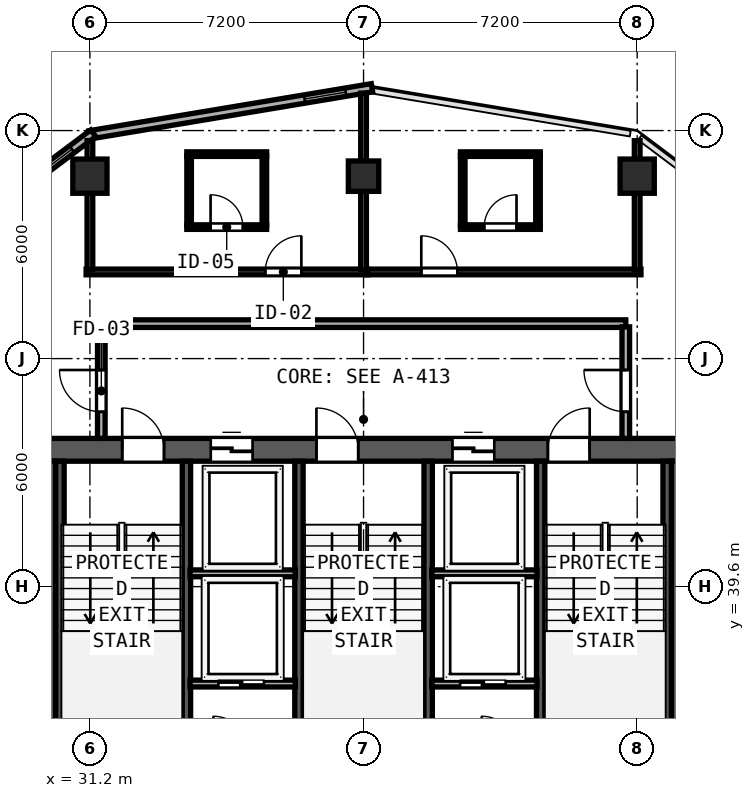
"""IFC4 building model, lengths in metres.
Left out: names, types, materials, properties, quantities, classifications, styles, units other than length and angle.
Written with IfcOpenShell. Run it as: python <this file> out.ifc"""

import sys

from ifc_helpers import new_model, si_unit, direction, frame, frame_2d, origin, origin_2d, place, context, subcontext, project, spatial, rectangle, hollow_rectangle, extrude, element, fill, save


model = new_model("IFC4")
c1 = context("Model", 3, precision=1e-05, world=origin(), true_north=direction((0.0, 1.0)))
c2 = subcontext(c1, "Body", "Model", "MODEL_VIEW")
j1 = project(units=[si_unit("LENGTHUNIT", "METRE"), si_unit("PLANEANGLEUNIT", "RADIAN")], contexts=[c1])
p1 = place(None, origin())
s1 = spatial("IfcSite", under=j1, at=p1, CompositionType="ELEMENT")
p2 = place(p1, origin())
s2 = spatial("IfcBuilding", under=s1, at=p2, CompositionType="ELEMENT")
p3 = place(p2, frame((0.0, 0.0, 215.4)))
s3 = spatial("IfcBuildingStorey", under=s2, at=p3, CompositionType="ELEMENT", Elevation=215.4)
p4 = place(p3, frame((29.7, 43.2, 0.0), z_axis=(0.0, 0.0, 1.0), x_axis=(1.0, 0.0, 0.0)))
e1 = element("IfcWall", 1, at=p4, inside=s3, PredefinedType="SHEAR", context=c2, shape_type="SweptSolid", body=[
    extrude(rectangle(XDim=17.4, YDim=0.6, at=frame_2d((8.7, 0.0))), origin(), (0.0, 0.0, 1.0), 3.62),
])
p5 = place(p4, frame((2.35, 0.0, 0.0)))
e2 = element("IfcOpeningElement", 2, at=p5, cuts=e1, PredefinedType="OPENING", context=c2, shape_type="SweptSolid", body=[
    extrude(rectangle(XDim=1.1, YDim=2.15, at=frame_2d((0.55, 1.075))), frame((0.0, 0.31, 0.0), z_axis=(0.0, -1.0, 0.0), x_axis=(1.0, 0.0, 0.0)), (0.0, 0.0, 1.0), 0.62),
])
p6 = place(p4, frame((7.46, 0.0, 0.0)))
e3 = element("IfcOpeningElement", 3, at=p6, cuts=e1, PredefinedType="OPENING", context=c2, shape_type="SweptSolid", body=[
    extrude(rectangle(XDim=1.1, YDim=2.15, at=frame_2d((0.55, 1.075))), frame((0.0, 0.31, 0.0), z_axis=(0.0, -1.0, 0.0), x_axis=(1.0, 0.0, 0.0)), (0.0, 0.0, 1.0), 0.62),
])
p7 = place(p4, frame((13.55, 0.0, 0.0)))
e4 = element("IfcOpeningElement", 4, at=p7, cuts=e1, PredefinedType="OPENING", context=c2, shape_type="SweptSolid", body=[
    extrude(rectangle(XDim=1.1, YDim=2.15, at=frame_2d((0.55, 1.075))), frame((0.0, 0.31, 0.0), z_axis=(0.0, -1.0, 0.0), x_axis=(1.0, 0.0, 0.0)), (0.0, 0.0, 1.0), 0.62),
])
p8 = place(p4, frame((4.68, 0.0, 0.0)))
e5 = element("IfcOpeningElement", 5, at=p8, cuts=e1, PredefinedType="OPENING", context=c2, shape_type="SweptSolid", body=[
    extrude(rectangle(XDim=1.1, YDim=2.2, at=frame_2d((0.55, 1.1))), frame((0.0, 0.31, 0.0), z_axis=(0.0, -1.0, 0.0), x_axis=(1.0, 0.0, 0.0)), (0.0, 0.0, 1.0), 0.62),
])
p9 = place(p4, frame((11.04, 0.0, 0.0)))
e6 = element("IfcOpeningElement", 6, at=p9, cuts=e1, PredefinedType="OPENING", context=c2, shape_type="SweptSolid", body=[
    extrude(rectangle(XDim=1.1, YDim=2.2, at=frame_2d((0.55, 1.1))), frame((0.0, 0.31, 0.0), z_axis=(0.0, -1.0, 0.0), x_axis=(1.0, 0.0, 0.0)), (0.0, 0.0, 1.0), 0.62),
])
for number, where, z_axis, x_axis in (
    (7, (30.0, 32.8, 0.0), (0.0, 0.0, 1.0), (0.0, 1.0, 0.0)),
    (8, (46.8, 32.8, 0.0), (0.0, 0.0, 1.0), (0.0, 1.0, 0.0)),
):
    element("IfcWall", number, at=place(p3, frame(where, z_axis=z_axis, x_axis=x_axis)), inside=s3, PredefinedType="SHEAR", context=c2, shape_type="SweptSolid", body=[
        extrude(rectangle(XDim=10.1, YDim=0.6, at=frame_2d((5.05, 0.0))), origin(), (0.0, 0.0, 1.0), 3.62),
    ])
for number, where, z_axis, x_axis in (
    (9, (30.412, 35.39, 0.0), (0.0, 0.0, 1.0), (0.0, 1.0, 0.0)),
    (10, (33.74, 35.39, 0.0), (0.0, 0.0, 1.0), (0.0, 1.0, 0.0)),
    (11, (36.7, 35.39, 0.0), (0.0, 0.0, 1.0), (0.0, 1.0, 0.0)),
    (12, (40.1, 35.39, 0.0), (0.0, 0.0, 1.0), (0.0, 1.0, 0.0)),
    (13, (43.06, 35.39, 0.0), (0.0, 0.0, 1.0), (0.0, 1.0, 0.0)),
    (14, (46.388, 35.39, 0.0), (0.0, 0.0, 1.0), (0.0, 1.0, 0.0)),
):
    element("IfcWall", number, at=place(p3, frame(where, z_axis=z_axis, x_axis=x_axis)), inside=s3, PredefinedType="SHEAR", context=c2, shape_type="SweptSolid", body=[
        extrude(rectangle(XDim=7.51, YDim=0.22, at=frame_2d((3.755, 0.0))), origin(), (0.0, 0.0, 1.0), 3.62),
    ])
for number, where, z_axis, x_axis in (
    (15, (31.2, 50.4, 0.0), (0.0, 0.0, 1.0), (1.0, 0.0, 0.0)),
    (16, (45.6, 50.4, 0.0), (0.0, 0.0, 1.0), (1.0, 0.0, 0.0)),
):
    element("IfcColumn", number, at=place(p3, frame(where, z_axis=z_axis, x_axis=x_axis)), inside=s3, PredefinedType="COLUMN", context=c2, shape_type="SweptSolid", body=[
        extrude(hollow_rectangle(XDim=0.9, YDim=0.9, WallThickness=0.034, at=origin_2d()), origin(), (0.0, 0.0, 1.0), 3.8),
    ])
p10 = place(p3, frame((38.4, 50.4, 0.0), z_axis=(0.0, 0.0, 1.0), x_axis=(1.0, 0.0, 0.0)))
e17 = element("IfcColumn", 17, at=p10, inside=s3, PredefinedType="COLUMN", context=c2, shape_type="SweptSolid", body=[
    extrude(hollow_rectangle(XDim=0.8, YDim=0.8, WallThickness=0.03, at=origin_2d()), origin(), (0.0, 0.0, 1.0), 3.8),
])
p11 = place(p3, frame((38.622, 52.726, 0.0), z_axis=(0.0, 0.0, 1.0), x_axis=(-0.986390420428, -0.164420006349, 0.0)))
e18 = element("IfcWall", 18, at=p11, inside=s3, PredefinedType="SOLIDWALL", context=c2, shape_type="SweptSolid", body=[
    extrude(rectangle(XDim=7.534, YDim=0.22, at=frame_2d((3.767, 0.0))), origin(), (0.0, 0.0, 1.0), 3.62),
])
p12 = place(p11, frame((0.7, 0.0, 0.85)))
e19 = element("IfcOpeningElement", 19, at=p12, cuts=e18, PredefinedType="OPENING", context=c2, shape_type="SweptSolid", body=[
    extrude(rectangle(XDim=1.1, YDim=1.75, at=frame_2d((0.55, 0.875))), frame((0.0, 0.12, 0.0), z_axis=(0.0, -1.0, 0.0), x_axis=(1.0, 0.0, 0.0)), (0.0, 0.0, 1.0), 0.24),
])
p13 = place(p3, frame((31.289, 51.529, 0.0), z_axis=(0.0, 0.0, 1.0), x_axis=(-0.800014580093, -0.599980559383, 0.0)))
e20 = element("IfcWall", 20, at=p13, inside=s3, PredefinedType="SOLIDWALL", context=c2, shape_type="SweptSolid", body=[
    extrude(rectangle(XDim=6.028, YDim=0.22, at=frame_2d((3.014, 0.0))), origin(), (0.0, 0.0, 1.0), 3.62),
])
p14 = place(p13, frame((0.7, 0.0, 0.85)))
e21 = element("IfcOpeningElement", 21, at=p14, cuts=e20, PredefinedType="OPENING", context=c2, shape_type="SweptSolid", body=[
    extrude(rectangle(XDim=1.1, YDim=1.75, at=frame_2d((0.55, 0.875))), frame((0.0, 0.12, 0.0), z_axis=(0.0, -1.0, 0.0), x_axis=(1.0, 0.0, 0.0)), (0.0, 0.0, 1.0), 0.24),
])
p15 = place(p3, frame((31.5, 46.52, 0.0), z_axis=(0.0, 0.0, 1.0), x_axis=(1.0, 0.0, 0.0)))
e22 = element("IfcWall", 22, at=p15, inside=s3, PredefinedType="SOLIDWALL", context=c2, shape_type="SweptSolid", body=[
    extrude(rectangle(XDim=13.8, YDim=0.2, at=frame_2d((6.9, 0.0))), origin(), (0.0, 0.0, 1.0), 3.62),
])
p16 = place(p3, frame((31.5, 43.5, 0.0), z_axis=(0.0, 0.0, 1.0), x_axis=(0.0, 1.0, 0.0)))
e23 = element("IfcWall", 23, at=p16, inside=s3, PredefinedType="SOLIDWALL", context=c2, shape_type="SweptSolid", body=[
    extrude(rectangle(XDim=2.935, YDim=0.2, at=frame_2d((1.468, 0.0))), origin(), (0.0, 0.0, 1.0), 3.62),
])
p17 = place(p16, frame((1.8, 0.0, 0.0), z_axis=(0.0, 0.0, 1.0), x_axis=(-1.0, 0.0, 0.0)))
e24 = element("IfcOpeningElement", 24, at=p17, cuts=e23, PredefinedType="OPENING", context=c2, shape_type="SweptSolid", body=[
    extrude(rectangle(XDim=1.1, YDim=2.15, at=frame_2d((0.55, 1.075))), frame((0.0, 0.11, 0.0), z_axis=(0.0, -1.0, 0.0), x_axis=(1.0, 0.0, 0.0)), (0.0, 0.0, 1.0), 0.22),
])
p18 = place(p3, frame((45.3, 43.5, 0.0), z_axis=(0.0, 0.0, 1.0), x_axis=(0.0, 1.0, 0.0)))
e25 = element("IfcWall", 25, at=p18, inside=s3, PredefinedType="SOLIDWALL", context=c2, shape_type="SweptSolid", body=[
    extrude(rectangle(XDim=2.935, YDim=0.2, at=frame_2d((1.468, 0.0))), origin(), (0.0, 0.0, 1.0), 3.62),
])
p19 = place(p18, frame((0.7, 0.0, 0.0)))
e26 = element("IfcOpeningElement", 26, at=p19, cuts=e25, PredefinedType="OPENING", context=c2, shape_type="SweptSolid", body=[
    extrude(rectangle(XDim=1.1, YDim=2.15, at=frame_2d((0.55, 1.075))), frame((0.0, 0.11, 0.0), z_axis=(0.0, -1.0, 0.0), x_axis=(1.0, 0.0, 0.0)), (0.0, 0.0, 1.0), 0.22),
])
for number, where, z_axis, x_axis in (
    (27, (33.835, 39.95, 0.0), (0.0, 0.0, 1.0), (1.0, 0.0, 0.0)),
    (28, (40.195, 39.95, 0.0), (0.0, 0.0, 1.0), (1.0, 0.0, 0.0)),
):
    element("IfcWall", number, at=place(p3, frame(where, z_axis=z_axis, x_axis=x_axis)), inside=s3, PredefinedType="SOLIDWALL", context=c2, shape_type="SweptSolid", body=[
        extrude(rectangle(XDim=2.77, YDim=0.18, at=frame_2d((1.385, 0.0))), origin(), (0.0, 0.0, 1.0), 3.62),
    ])
p20 = place(p3, frame((33.835, 37.05, 0.0), z_axis=(0.0, 0.0, 1.0), x_axis=(1.0, 0.0, 0.0)))
e29 = element("IfcWall", 29, at=p20, inside=s3, PredefinedType="SOLIDWALL", context=c2, shape_type="SweptSolid", body=[
    extrude(rectangle(XDim=2.77, YDim=0.18, at=frame_2d((1.385, 0.0))), origin(), (0.0, 0.0, 1.0), 3.62),
])
p21 = place(p20, frame((1.945, 0.0, 0.0), z_axis=(0.0, 0.0, 1.0), x_axis=(-1.0, 0.0, 0.0)))
e30 = element("IfcOpeningElement", 30, at=p21, cuts=e29, PredefinedType="OPENING", context=c2, shape_type="SweptSolid", body=[
    extrude(rectangle(XDim=1.2, YDim=2.2, at=frame_2d((0.6, 1.1))), frame((0.0, 0.1, 0.0), z_axis=(0.0, -1.0, 0.0), x_axis=(1.0, 0.0, 0.0)), (0.0, 0.0, 1.0), 0.2),
])
p22 = place(p3, frame((40.195, 37.05, 0.0), z_axis=(0.0, 0.0, 1.0), x_axis=(1.0, 0.0, 0.0)))
e31 = element("IfcWall", 31, at=p22, inside=s3, PredefinedType="SOLIDWALL", context=c2, shape_type="SweptSolid", body=[
    extrude(rectangle(XDim=2.77, YDim=0.18, at=frame_2d((1.385, 0.0))), origin(), (0.0, 0.0, 1.0), 3.62),
])
p23 = place(p22, frame((1.945, 0.0, 0.0), z_axis=(0.0, 0.0, 1.0), x_axis=(-1.0, 0.0, 0.0)))
e32 = element("IfcOpeningElement", 32, at=p23, cuts=e31, PredefinedType="OPENING", context=c2, shape_type="SweptSolid", body=[
    extrude(rectangle(XDim=1.2, YDim=2.2, at=frame_2d((0.6, 1.1))), frame((0.0, 0.1, 0.0), z_axis=(0.0, -1.0, 0.0), x_axis=(1.0, 0.0, 0.0)), (0.0, 0.0, 1.0), 0.2),
])
p24 = place(p3, frame((31.1, 47.88, 0.0), z_axis=(0.0, 0.0, 1.0), x_axis=(1.0, 0.0, 0.0)))
e33 = element("IfcWall", 33, at=p24, inside=s3, PredefinedType="PARTITIONING", context=c2, shape_type="SweptSolid", body=[
    extrude(rectangle(XDim=7.4, YDim=0.15, at=frame_2d((3.7, 0.0))), origin(), (0.0, 0.0, 1.0), 3.62),
])
p25 = place(p24, frame((4.714, 0.0, 0.0)))
e34 = element("IfcOpeningElement", 34, at=p25, cuts=e33, PredefinedType="OPENING", context=c2, shape_type="SweptSolid", body=[
    extrude(rectangle(XDim=0.95, YDim=2.15, at=frame_2d((0.475, 1.075))), frame((0.0, 0.085, 0.0), z_axis=(0.0, -1.0, 0.0), x_axis=(1.0, 0.0, 0.0)), (0.0, 0.0, 1.0), 0.17),
])
p26 = place(p3, frame((31.2, 47.94, 0.0), z_axis=(0.0, 0.0, 1.0), x_axis=(0.0, 1.0, 0.0)))
e35 = element("IfcWall", 35, at=p26, inside=s3, PredefinedType="PARTITIONING", context=c2, shape_type="SweptSolid", body=[
    extrude(rectangle(XDim=3.395, YDim=0.15, at=frame_2d((1.698, 0.0))), origin(), (0.0, 0.0, 1.0), 3.105),
])
p27 = place(p3, frame((38.4, 47.94, 0.0), z_axis=(0.0, 0.0, 1.0), x_axis=(0.0, 1.0, 0.0)))
e36 = element("IfcWall", 36, at=p27, inside=s3, PredefinedType="PARTITIONING", context=c2, shape_type="SweptSolid", body=[
    extrude(rectangle(XDim=4.645, YDim=0.15, at=frame_2d((2.323, 0.0))), origin(), (0.0, 0.0, 1.0), 3.62),
])
p28 = place(p3, frame((33.75, 50.98, 0.0), z_axis=(0.0, 0.0, 1.0), x_axis=(1.0, 0.0, 0.0)))
e37 = element("IfcWall", 37, at=p28, inside=s3, PredefinedType="PARTITIONING", context=c2, shape_type="SweptSolid", body=[
    extrude(rectangle(XDim=2.1, YDim=0.12, at=frame_2d((1.05, 0.0))), origin(), (0.0, 0.0, 1.0), 3.62),
])
p29 = place(p3, frame((33.75, 49.06, 0.0), z_axis=(0.0, 0.0, 1.0), x_axis=(1.0, 0.0, 0.0)))
e38 = element("IfcWall", 38, at=p29, inside=s3, PredefinedType="PARTITIONING", context=c2, shape_type="SweptSolid", body=[
    extrude(rectangle(XDim=2.1, YDim=0.12, at=frame_2d((1.05, 0.0))), origin(), (0.0, 0.0, 1.0), 3.62),
])
p30 = place(p29, frame((0.625, 0.0, 0.0)))
e39 = element("IfcOpeningElement", 39, at=p30, cuts=e38, PredefinedType="OPENING", context=c2, shape_type="SweptSolid", body=[
    extrude(rectangle(XDim=0.85, YDim=2.1, at=frame_2d((0.425, 1.05))), frame((0.0, 0.07, 0.0), z_axis=(0.0, -1.0, 0.0), x_axis=(1.0, 0.0, 0.0)), (0.0, 0.0, 1.0), 0.14),
])
for number, where, z_axis, x_axis in (
    (40, (33.81, 49.105, 0.0), (0.0, 0.0, 1.0), (0.0, 1.0, 0.0)),
    (41, (35.79, 49.105, 0.0), (0.0, 0.0, 1.0), (0.0, 1.0, 0.0)),
):
    element("IfcWall", number, at=place(p3, frame(where, z_axis=z_axis, x_axis=x_axis)), inside=s3, PredefinedType="PARTITIONING", context=c2, shape_type="SweptSolid", body=[
        extrude(rectangle(XDim=1.83, YDim=0.12, at=frame_2d((0.915, 0.0))), origin(), (0.0, 0.0, 1.0), 3.62),
    ])
p31 = place(p3, frame((38.502, 47.88, 0.0), z_axis=(0.0, 0.0, 1.0), x_axis=(1.0, 0.0, 0.0)))
e42 = element("IfcWall", 42, at=p31, inside=s3, PredefinedType="PARTITIONING", context=c2, shape_type="SweptSolid", body=[
    extrude(rectangle(XDim=7.198, YDim=0.15, at=frame_2d((3.599, 0.0))), origin(), (0.0, 0.0, 1.0), 3.62),
])
p32 = place(p31, frame((1.417, 0.0, 0.0)))
e43 = element("IfcOpeningElement", 43, at=p32, cuts=e42, PredefinedType="OPENING", context=c2, shape_type="SweptSolid", body=[
    extrude(rectangle(XDim=0.95, YDim=2.15, at=frame_2d((0.475, 1.075))), frame((0.0, 0.085, 0.0), z_axis=(0.0, -1.0, 0.0), x_axis=(1.0, 0.0, 0.0)), (0.0, 0.0, 1.0), 0.17),
])
p33 = place(p3, frame((45.6, 47.94, 0.0), z_axis=(0.0, 0.0, 1.0), x_axis=(0.0, 1.0, 0.0)))
e44 = element("IfcWall", 44, at=p33, inside=s3, PredefinedType="PARTITIONING", context=c2, shape_type="SweptSolid", body=[
    extrude(rectangle(XDim=3.395, YDim=0.15, at=frame_2d((1.698, 0.0))), origin(), (0.0, 0.0, 1.0), 3.105),
])
p34 = place(p3, frame((40.95, 50.98, 0.0), z_axis=(0.0, 0.0, 1.0), x_axis=(1.0, 0.0, 0.0)))
e45 = element("IfcWall", 45, at=p34, inside=s3, PredefinedType="PARTITIONING", context=c2, shape_type="SweptSolid", body=[
    extrude(rectangle(XDim=2.1, YDim=0.12, at=frame_2d((1.05, 0.0))), origin(), (0.0, 0.0, 1.0), 3.62),
])
p35 = place(p3, frame((40.95, 49.06, 0.0), z_axis=(0.0, 0.0, 1.0), x_axis=(1.0, 0.0, 0.0)))
e46 = element("IfcWall", 46, at=p35, inside=s3, PredefinedType="PARTITIONING", context=c2, shape_type="SweptSolid", body=[
    extrude(rectangle(XDim=2.1, YDim=0.12, at=frame_2d((1.05, 0.0))), origin(), (0.0, 0.0, 1.0), 3.62),
])
p36 = place(p35, frame((0.625, 0.0, 0.0)))
e47 = element("IfcOpeningElement", 47, at=p36, cuts=e46, PredefinedType="OPENING", context=c2, shape_type="SweptSolid", body=[
    extrude(rectangle(XDim=0.85, YDim=2.1, at=frame_2d((0.425, 1.05))), frame((0.0, 0.07, 0.0), z_axis=(0.0, -1.0, 0.0), x_axis=(1.0, 0.0, 0.0)), (0.0, 0.0, 1.0), 0.14),
])
for number, where, z_axis, x_axis in (
    (48, (41.01, 49.105, 0.0), (0.0, 0.0, 1.0), (0.0, 1.0, 0.0)),
    (49, (42.99, 49.105, 0.0), (0.0, 0.0, 1.0), (0.0, 1.0, 0.0)),
):
    element("IfcWall", number, at=place(p3, frame(where, z_axis=z_axis, x_axis=x_axis)), inside=s3, PredefinedType="PARTITIONING", context=c2, shape_type="SweptSolid", body=[
        extrude(rectangle(XDim=1.83, YDim=0.12, at=frame_2d((0.915, 0.0))), origin(), (0.0, 0.0, 1.0), 3.62),
    ])
p37 = place(p12, origin())
e50 = element("IfcWindow", 50, at=p37, inside=s3, PartitioningType="SINGLE_PANEL", PredefinedType="WINDOW", context=c2, shape_type="SweptSolid", body=[
    extrude(rectangle(XDim=1.1, YDim=1.75, at=frame_2d((0.55, 0.875))), frame((0.0, 0.03, 0.0), z_axis=(0.0, -1.0, 0.0), x_axis=(1.0, 0.0, 0.0)), (0.0, 0.0, 1.0), 0.06),
])
fill(e19, e50)
p38 = place(p14, origin())
e51 = element("IfcWindow", 51, at=p38, inside=s3, PartitioningType="SINGLE_PANEL", PredefinedType="WINDOW", context=c2, shape_type="SweptSolid", body=[
    extrude(rectangle(XDim=1.1, YDim=1.75, at=frame_2d((0.55, 0.875))), frame((0.0, 0.03, 0.0), z_axis=(0.0, -1.0, 0.0), x_axis=(1.0, 0.0, 0.0)), (0.0, 0.0, 1.0), 0.06),
])
fill(e21, e51)
p39 = place(p5, origin())
e52 = element("IfcDoor", 52, at=p39, inside=s3, OperationType="SINGLE_SWING_LEFT", PredefinedType="DOOR", context=c2, shape_type="SweptSolid", body=[
    extrude(rectangle(XDim=1.1, YDim=2.15, at=frame_2d((0.55, 1.075))), frame((0.0, 0.185, 0.0), z_axis=(0.0, -1.0, 0.0), x_axis=(1.0, 0.0, 0.0)), (0.0, 0.0, 1.0), 0.05),
])
fill(e2, e52)
p40 = place(p6, origin())
e53 = element("IfcDoor", 53, at=p40, inside=s3, OperationType="SINGLE_SWING_LEFT", PredefinedType="DOOR", context=c2, shape_type="SweptSolid", body=[
    extrude(rectangle(XDim=1.1, YDim=2.15, at=frame_2d((0.55, 1.075))), frame((0.0, 0.185, 0.0), z_axis=(0.0, -1.0, 0.0), x_axis=(1.0, 0.0, 0.0)), (0.0, 0.0, 1.0), 0.05),
])
fill(e3, e53)
p41 = place(p7, origin())
e54 = element("IfcDoor", 54, at=p41, inside=s3, OperationType="SINGLE_SWING_RIGHT", PredefinedType="DOOR", context=c2, shape_type="SweptSolid", body=[
    extrude(rectangle(XDim=1.1, YDim=2.15, at=frame_2d((0.55, 1.075))), frame((0.0, 0.185, 0.0), z_axis=(0.0, -1.0, 0.0), x_axis=(1.0, 0.0, 0.0)), (0.0, 0.0, 1.0), 0.05),
])
fill(e4, e54)
p42 = place(p17, origin())
e55 = element("IfcDoor", 55, at=p42, inside=s3, OperationType="SINGLE_SWING_LEFT", PredefinedType="DOOR", context=c2, shape_type="SweptSolid", body=[
    extrude(rectangle(XDim=1.1, YDim=2.15, at=frame_2d((0.55, 1.075))), frame((0.0, 0.025, 0.0), z_axis=(0.0, -1.0, 0.0), x_axis=(1.0, 0.0, 0.0)), (0.0, 0.0, 1.0), 0.05),
])
fill(e24, e55)
p43 = place(p19, origin())
e56 = element("IfcDoor", 56, at=p43, inside=s3, OperationType="SINGLE_SWING_RIGHT", PredefinedType="DOOR", context=c2, shape_type="SweptSolid", body=[
    extrude(rectangle(XDim=1.1, YDim=2.15, at=frame_2d((0.55, 1.075))), frame((0.0, 0.025, 0.0), z_axis=(0.0, -1.0, 0.0), x_axis=(1.0, 0.0, 0.0)), (0.0, 0.0, 1.0), 0.05),
])
fill(e26, e56)
p44 = place(p8, origin())
e57 = element("IfcDoor", 57, at=p44, inside=s3, OperationType="SLIDING_TO_LEFT", PredefinedType="DOOR", context=c2, shape_type="SweptSolid", body=[
    extrude(rectangle(XDim=1.1, YDim=2.2, at=frame_2d((0.55, 1.1))), frame((0.0, 0.185, 0.0), z_axis=(0.0, -1.0, 0.0), x_axis=(1.0, 0.0, 0.0)), (0.0, 0.0, 1.0), 0.05),
])
fill(e5, e57)
p45 = place(p9, origin())
e58 = element("IfcDoor", 58, at=p45, inside=s3, OperationType="SLIDING_TO_LEFT", PredefinedType="DOOR", context=c2, shape_type="SweptSolid", body=[
    extrude(rectangle(XDim=1.1, YDim=2.2, at=frame_2d((0.55, 1.1))), frame((0.0, 0.185, 0.0), z_axis=(0.0, -1.0, 0.0), x_axis=(1.0, 0.0, 0.0)), (0.0, 0.0, 1.0), 0.05),
])
fill(e6, e58)
p46 = place(p21, origin())
e59 = element("IfcDoor", 59, at=p46, inside=s3, OperationType="SLIDING_TO_RIGHT", PredefinedType="DOOR", context=c2, shape_type="SweptSolid", body=[
    extrude(rectangle(XDim=1.2, YDim=2.2, at=frame_2d((0.6, 1.1))), frame((0.0, 0.025, 0.0), z_axis=(0.0, -1.0, 0.0), x_axis=(1.0, 0.0, 0.0)), (0.0, 0.0, 1.0), 0.05),
])
fill(e30, e59)
p47 = place(p23, origin())
e60 = element("IfcDoor", 60, at=p47, inside=s3, OperationType="SLIDING_TO_RIGHT", PredefinedType="DOOR", context=c2, shape_type="SweptSolid", body=[
    extrude(rectangle(XDim=1.2, YDim=2.2, at=frame_2d((0.6, 1.1))), frame((0.0, 0.025, 0.0), z_axis=(0.0, -1.0, 0.0), x_axis=(1.0, 0.0, 0.0)), (0.0, 0.0, 1.0), 0.05),
])
fill(e32, e60)
p48 = place(p25, origin())
e61 = element("IfcDoor", 61, at=p48, inside=s3, OperationType="SINGLE_SWING_RIGHT", PredefinedType="DOOR", context=c2, shape_type="SweptSolid", body=[
    extrude(rectangle(XDim=0.95, YDim=2.15, at=frame_2d((0.475, 1.075))), frame((0.0, 0.025, 0.0), z_axis=(0.0, -1.0, 0.0), x_axis=(1.0, 0.0, 0.0)), (0.0, 0.0, 1.0), 0.05),
])
fill(e34, e61)
p49 = place(p30, origin())
e62 = element("IfcDoor", 62, at=p49, inside=s3, OperationType="SINGLE_SWING_LEFT", PredefinedType="DOOR", context=c2, shape_type="SweptSolid", body=[
    extrude(rectangle(XDim=0.85, YDim=2.1, at=frame_2d((0.425, 1.05))), frame((0.0, 0.025, 0.0), z_axis=(0.0, -1.0, 0.0), x_axis=(1.0, 0.0, 0.0)), (0.0, 0.0, 1.0), 0.05),
])
fill(e39, e62)
p50 = place(p32, origin())
e63 = element("IfcDoor", 63, at=p50, inside=s3, OperationType="SINGLE_SWING_LEFT", PredefinedType="DOOR", context=c2, shape_type="SweptSolid", body=[
    extrude(rectangle(XDim=0.95, YDim=2.15, at=frame_2d((0.475, 1.075))), frame((0.0, 0.025, 0.0), z_axis=(0.0, -1.0, 0.0), x_axis=(1.0, 0.0, 0.0)), (0.0, 0.0, 1.0), 0.05),
])
fill(e43, e63)
p51 = place(p36, origin())
e64 = element("IfcDoor", 64, at=p51, inside=s3, OperationType="SINGLE_SWING_RIGHT", PredefinedType="DOOR", context=c2, shape_type="SweptSolid", body=[
    extrude(rectangle(XDim=0.85, YDim=2.1, at=frame_2d((0.425, 1.05))), frame((0.0, 0.025, 0.0), z_axis=(0.0, -1.0, 0.0), x_axis=(1.0, 0.0, 0.0)), (0.0, 0.0, 1.0), 0.05),
])
fill(e47, e64)
save(model, sys.argv[1])
